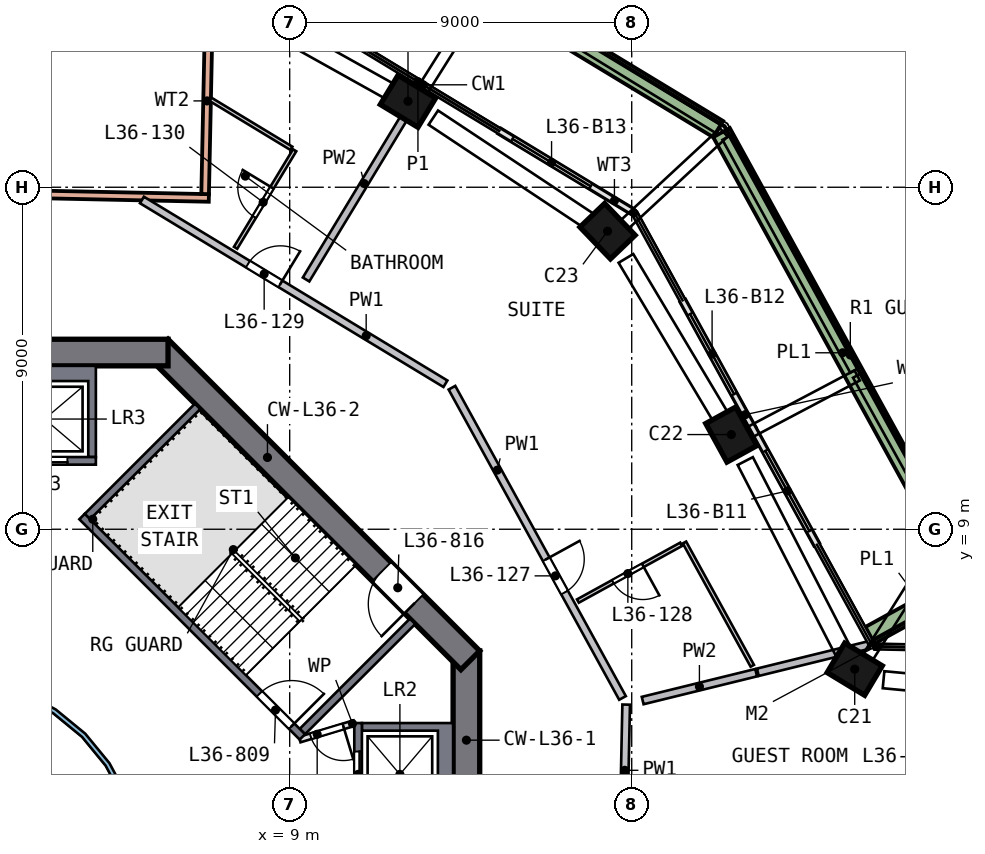
"""IFC4 building model, lengths in metres.
Left out: names, types, materials, properties, quantities, classifications, styles, units other than length and angle.
Written with IfcOpenShell. Run it as: python <this file> out.ifc"""

import sys

from ifc_helpers import new_model, si_unit, direction, frame, frame_2d, origin, origin_2d, place, context, subcontext, project, spatial, polyline, rectangle, outline, extrude, element, fill, save


model = new_model("IFC4")
c1 = context("Model", 3, precision=1e-05, world=origin(), true_north=direction((0.0, 1.0)))
c2 = subcontext(c1, "Body", "Model", "MODEL_VIEW")
j1 = project(units=[si_unit("LENGTHUNIT", "METRE"), si_unit("PLANEANGLEUNIT", "RADIAN")], contexts=[c1])
p1 = place(None, origin())
s1 = spatial("IfcSite", under=j1, at=p1, CompositionType="ELEMENT")
p2 = place(p1, origin())
s2 = spatial("IfcBuilding", under=s1, at=p2, CompositionType="ELEMENT")
p3 = place(p2, frame((0.0, 0.0, 150.5)))
s3 = spatial("IfcBuildingStorey", under=s2, at=p3, CompositionType="ELEMENT", Elevation=150.5)
p4 = place(p3, frame((23.899, 5.181, 0.0), z_axis=(-0.025617194, 0.113414997, 0.993217397), x_axis=(0.856238754, -0.510292454, 0.080354263)))
e1 = element("IfcColumn", 1, at=p4, inside=s3, PredefinedType="COLUMN", context=c2, shape_type="SweptSolid", body=[
    extrude(rectangle(XDim=1.15, YDim=0.9, at=origin_2d()), origin(), (0.0, 0.0, 1.0), 3.212),
])
p5 = place(p3, frame((20.688, 11.373, 0.0), z_axis=(-0.054908013, 0.098028295, 0.993667733), x_axis=(-0.478217839, 0.871024775, -0.112354524)))
e2 = element("IfcColumn", 2, at=p5, inside=s3, PredefinedType="COLUMN", context=c2, shape_type="SweptSolid", body=[
    extrude(rectangle(XDim=1.15, YDim=0.9, at=origin_2d()), origin(), (0.0, 0.0, 1.0), 3.21),
])
p6 = place(p3, frame((17.461, 16.745, 0.0), z_axis=(-0.080284249, 0.082336971, 0.993365523), x_axis=(0.687431138, -0.717087466, 0.114995638)))
e3 = element("IfcColumn", 3, at=p6, inside=s3, PredefinedType="COLUMN", context=c2, shape_type="SweptSolid", body=[
    extrude(rectangle(XDim=1.15, YDim=0.9, at=origin_2d()), origin(), (0.0, 0.0, 1.0), 3.211),
])
p7 = place(p3, frame((12.23, 20.194, 0.0), z_axis=(-0.096507973, 0.057418061, 0.993674684), x_axis=(-0.849621729, 0.515299129, -0.112293037)))
e4 = element("IfcColumn", 4, at=p7, inside=s3, PredefinedType="COLUMN", context=c2, shape_type="SweptSolid", body=[
    extrude(rectangle(XDim=1.15, YDim=0.9, at=origin_2d()), origin(), (0.0, 0.0, 1.0), 3.21),
])
p8 = place(p3, frame((13.65, -5.799, 0.0), z_axis=(0.0, 0.0, 1.0), x_axis=(0.0, 1.0, 0.0)))
e5 = element("IfcWall", 5, at=p8, inside=s3, PredefinedType="SHEAR", context=c2, shape_type="SweptSolid", body=[
    extrude(rectangle(XDim=11.598, YDim=0.7, at=frame_2d((5.799, 0.0))), origin(), (0.0, 0.0, 1.0), 3.5),
])
p9 = place(p8, frame((4.899, 0.0, 0.0)))
e6 = element("IfcOpeningElement", 6, at=p9, cuts=e5, PredefinedType="OPENING", context=c2, shape_type="SweptSolid", body=[
    extrude(rectangle(XDim=1.8, YDim=2.1, at=frame_2d((0.9, 1.05))), frame((0.0, 0.36, 0.0), z_axis=(0.0, -1.0, 0.0), x_axis=(1.0, 0.0, 0.0)), (0.0, 0.0, 1.0), 0.72),
])
p10 = place(p3, frame((13.752, 5.552, 0.0), z_axis=(0.0, 0.0, 1.0), x_axis=(-0.707106781, 0.707106781, 0.0)))
e7 = element("IfcWall", 7, at=p10, inside=s3, PredefinedType="SHEAR", context=c2, shape_type="SweptSolid", body=[
    extrude(rectangle(XDim=11.598, YDim=0.7, at=frame_2d((5.799, 0.0))), origin(), (0.0, 0.0, 1.0), 3.5),
])
p11 = place(p10, frame((2.099, 0.0, 0.0)))
e8 = element("IfcOpeningElement", 8, at=p11, cuts=e7, PredefinedType="OPENING", context=c2, shape_type="SweptSolid", body=[
    extrude(rectangle(XDim=1.2, YDim=2.1, at=frame_2d((0.6, 1.05))), frame((0.0, 0.36, 0.0), z_axis=(0.0, -1.0, 0.0), x_axis=(1.0, 0.0, 0.0)), (0.0, 0.0, 1.0), 0.72),
])
p12 = place(p3, frame((5.799, 13.65, 0.0), z_axis=(0.0, 0.0, 1.0), x_axis=(-1.0, 0.0, 0.0)))
e9 = element("IfcWall", 9, at=p12, inside=s3, PredefinedType="SHEAR", context=c2, shape_type="SweptSolid", body=[
    extrude(rectangle(XDim=11.598, YDim=0.7, at=frame_2d((5.799, 0.0))), origin(), (0.0, 0.0, 1.0), 3.5),
])
p13 = place(p12, frame((4.899, 0.0, 0.0)))
e10 = element("IfcOpeningElement", 10, at=p13, cuts=e9, PredefinedType="OPENING", context=c2, shape_type="SweptSolid", body=[
    extrude(rectangle(XDim=1.8, YDim=2.1, at=frame_2d((0.9, 1.05))), frame((0.0, 0.36, 0.0), z_axis=(0.0, -1.0, 0.0), x_axis=(1.0, 0.0, 0.0)), (0.0, 0.0, 1.0), 0.72),
])
p14 = place(p3, frame((22.866, 8.605, 0.0), z_axis=(0.0, 0.0, 1.0), x_axis=(-0.481802779, 0.876279683, 0.0)))
e11 = element("IfcWall", 11, at=p14, inside=s3, PredefinedType="SOLIDWALL", context=c2, shape_type="SweptSolid", body=[
    extrude(rectangle(XDim=3.475, YDim=0.15, at=frame_2d((1.738, 0.0))), origin(), (0.0, 0.0, 1.0), 2.475),
])
p15 = place(p14, frame((0.4, 0.0, 0.0)))
e12 = element("IfcOpeningElement", 12, at=p15, cuts=e11, PredefinedType="OPENING", context=c2, shape_type="SweptSolid", body=[
    extrude(rectangle(XDim=2.4, YDim=2.4, at=frame_2d((1.2, 1.2))), frame((0.0, 0.085, 0.0), z_axis=(0.0, -1.0, 0.0), x_axis=(1.0, 0.0, 0.0)), (0.0, 0.0, 1.0), 0.17),
])
p16 = place(p3, frame((21.192, 11.65, 0.0), z_axis=(0.0, 0.0, 1.0), x_axis=(-0.481730588, 0.876319371, 0.0)))
e13 = element("IfcWall", 13, at=p16, inside=s3, PredefinedType="SOLIDWALL", context=c2, shape_type="SweptSolid", body=[
    extrude(rectangle(XDim=3.835, YDim=0.15, at=frame_2d((1.918, 0.0))), origin(), (0.0, 0.0, 1.0), 2.475),
])
p17 = place(p16, frame((1.035, 0.0, 0.0)))
e14 = element("IfcOpeningElement", 14, at=p17, cuts=e13, PredefinedType="OPENING", context=c2, shape_type="SweptSolid", body=[
    extrude(rectangle(XDim=2.4, YDim=2.4, at=frame_2d((1.2, 1.2))), frame((0.0, 0.085, 0.0), z_axis=(0.0, -1.0, 0.0), x_axis=(1.0, 0.0, 0.0)), (0.0, 0.0, 1.0), 0.17),
])
p18 = place(p3, frame((18.002, 17.37, 0.0), z_axis=(0.0, 0.0, 1.0), x_axis=(-0.855372717, 0.518013045, 0.0)))
e15 = element("IfcWall", 15, at=p18, inside=s3, PredefinedType="SOLIDWALL", context=c2, shape_type="SweptSolid", body=[
    extrude(rectangle(XDim=4.068, YDim=0.15, at=frame_2d((2.034, 0.0))), origin(), (0.0, 0.0, 1.0), 2.475),
])
p19 = place(p18, frame((1.268, 0.0, 0.0)))
e16 = element("IfcOpeningElement", 16, at=p19, cuts=e15, PredefinedType="OPENING", context=c2, shape_type="SweptSolid", body=[
    extrude(rectangle(XDim=2.4, YDim=2.4, at=frame_2d((1.2, 1.2))), frame((0.0, 0.085, 0.0), z_axis=(0.0, -1.0, 0.0), x_axis=(1.0, 0.0, 0.0)), (0.0, 0.0, 1.0), 0.17),
])
p20 = place(p3, frame((24.27, 6.21, 0.0), z_axis=(0.0, 0.0, 1.0), x_axis=(0.876333505, 0.481704876, 0.0)))
e17 = element("IfcWall", 17, at=p20, inside=s3, PredefinedType="SOLIDWALL", context=c2, shape_type="SweptSolid", body=[
    extrude(rectangle(XDim=3.199, YDim=0.5, at=frame_2d((1.6, 0.0))), origin(), (0.0, 0.0, 1.0), 0.7),
])
p21 = place(p3, frame((26.733, 7.85, 0.0), z_axis=(0.0, 0.0, 1.0), x_axis=(-0.481759986, 0.87630321, 0.0)))
e18 = element("IfcWall", 18, at=p21, inside=s3, PredefinedType="SOLIDWALL", context=c2, shape_type="SweptSolid", body=[
    extrude(rectangle(XDim=13.224, YDim=0.5, at=frame_2d((6.612, 0.0))), origin(), (0.0, 0.0, 1.0), 0.7),
])
p22 = place(p3, frame((20.273, 19.531, 0.0), z_axis=(0.0, 0.0, 1.0), x_axis=(-0.855368156, 0.518020576, 0.0)))
e19 = element("IfcWall", 19, at=p22, inside=s3, PredefinedType="SOLIDWALL", context=c2, shape_type="SweptSolid", body=[
    extrude(rectangle(XDim=13.724, YDim=0.5, at=frame_2d((6.862, 0.0))), origin(), (0.0, 0.0, 1.0), 0.7),
])
p23 = place(p3, frame((-6.125, 17.99, 0.0), z_axis=(0.0, 0.0, 1.0), x_axis=(0.999780737, -0.020939881, 0.0)))
e20 = element("IfcWall", 20, at=p23, inside=s3, PredefinedType="SOLIDWALL", context=c2, shape_type="SweptSolid", body=[
    extrude(rectangle(XDim=13.0, YDim=0.2, at=frame_2d((6.5, 0.0))), origin(), (0.0, 0.0, 1.0), 3.19),
])
p24 = place(p23, frame((5.6, 0.0, 0.0)))
e21 = element("IfcOpeningElement", 21, at=p24, cuts=e20, PredefinedType="OPENING", context=c2, shape_type="SweptSolid", body=[
    extrude(rectangle(XDim=1.8, YDim=2.4, at=frame_2d((0.9, 1.2))), frame((0.0, 0.11, 0.0), z_axis=(0.0, -1.0, 0.0), x_axis=(1.0, 0.0, 0.0)), (0.0, 0.0, 1.0), 0.22),
])
p25 = place(p3, frame((6.877, 22.724, 0.0), z_axis=(0.0, 0.0, 1.0), x_axis=(-0.020957356, -0.99978037, 0.0)))
e22 = element("IfcWall", 22, at=p25, inside=s3, PredefinedType="SOLIDWALL", context=c2, shape_type="SweptSolid", body=[
    extrude(rectangle(XDim=4.904, YDim=0.2, at=frame_2d((2.452, 0.0))), origin(), (0.0, 0.0, 1.0), 3.19),
])
p26 = place(p3, origin())
e23 = element("IfcWall", 23, at=p26, inside=s3, PredefinedType="SOLIDWALL", context=c2, shape_type="SweptSolid", body=[
    extrude(outline(polyline([(13.3, 3.9), (13.3, 1.2), (10.9, 1.2), (10.9, 1.4), (12.9, 1.4), (12.9, 3.7), (10.9, 3.7), (10.9, 3.9), (13.3, 3.9)])), origin(), (0.0, 0.0, 1.0), 3.19),
])
p27 = place(p3, frame((10.8, 1.2, 0.0), z_axis=(0.0, 0.0, 1.0), x_axis=(0.0, 1.0, 0.0)))
e24 = element("IfcWall", 24, at=p27, inside=s3, PredefinedType="SOLIDWALL", context=c2, shape_type="SweptSolid", body=[
    extrude(rectangle(XDim=2.7, YDim=0.2, at=frame_2d((1.35, 0.0))), origin(), (0.0, 0.0, 1.0), 3.19),
])
p28 = place(p27, frame((0.75, 0.0, 0.0)))
e25 = element("IfcOpeningElement", 25, at=p28, cuts=e24, PredefinedType="OPENING", context=c2, shape_type="SweptSolid", body=[
    extrude(rectangle(XDim=1.2, YDim=2.1, at=frame_2d((0.6, 1.05))), frame((0.0, 0.11, 0.0), z_axis=(0.0, -1.0, 0.0), x_axis=(1.0, 0.0, 0.0)), (0.0, 0.0, 1.0), 0.22),
])
p29 = place(p3, origin())
e26 = element("IfcWall", 26, at=p29, inside=s3, PredefinedType="SOLIDWALL", context=c2, shape_type="SweptSolid", body=[
    extrude(outline(polyline([(3.9, 13.3), (3.9, 10.9), (3.7, 10.9), (3.7, 12.9), (1.4, 12.9), (1.4, 10.9), (1.2, 10.9), (1.2, 13.3), (3.9, 13.3)])), origin(), (0.0, 0.0, 1.0), 3.19),
])
p30 = place(p3, frame((1.2, 10.8, 0.0), z_axis=(0.0, 0.0, 1.0), x_axis=(1.0, 0.0, 0.0)))
e27 = element("IfcWall", 27, at=p30, inside=s3, PredefinedType="SOLIDWALL", context=c2, shape_type="SweptSolid", body=[
    extrude(rectangle(XDim=2.7, YDim=0.2, at=frame_2d((1.35, 0.0))), origin(), (0.0, 0.0, 1.0), 3.19),
])
p31 = place(p30, frame((0.75, 0.0, 0.0)))
e28 = element("IfcOpeningElement", 28, at=p31, cuts=e27, PredefinedType="OPENING", context=c2, shape_type="SweptSolid", body=[
    extrude(rectangle(XDim=1.2, YDim=2.1, at=frame_2d((0.6, 1.05))), frame((0.0, 0.11, 0.0), z_axis=(0.0, -1.0, 0.0), x_axis=(1.0, 0.0, 0.0)), (0.0, 0.0, 1.0), 0.22),
])
p32 = place(p3, frame((3.535, 9.334, 0.0), z_axis=(0.0, 0.0, 1.0), x_axis=(0.707106781, -0.707106781, 0.0)))
e29 = element("IfcWall", 29, at=p32, inside=s3, PredefinedType="SOLIDWALL", context=c2, shape_type="SweptSolid", body=[
    extrude(rectangle(XDim=8.2, YDim=0.2, at=frame_2d((4.1, 0.0))), origin(), (0.0, 0.0, 1.0), 3.19),
])
p33 = place(p32, frame((6.6, 0.0, 0.0)))
e30 = element("IfcOpeningElement", 30, at=p33, cuts=e29, PredefinedType="OPENING", context=c2, shape_type="SweptSolid", body=[
    extrude(rectangle(XDim=1.2, YDim=2.1, at=frame_2d((0.6, 1.05))), frame((0.0, 0.11, 0.0), z_axis=(0.0, -1.0, 0.0), x_axis=(1.0, 0.0, 0.0)), (0.0, 0.0, 1.0), 0.22),
])
for number, where, z_axis, x_axis in (
    (31, (9.334, 3.677, 0.0), (0.0, 0.0, 1.0), (0.707, 0.707, 0.0)),
    (32, (3.677, 9.334, 0.0), (0.0, 0.0, 1.0), (0.707, 0.707, 0.0)),
):
    element("IfcWall", number, at=place(p3, frame(where, z_axis=z_axis, x_axis=x_axis)), inside=s3, PredefinedType="SOLIDWALL", context=c2, shape_type="SweptSolid", body=[
        extrude(rectangle(XDim=4.1, YDim=0.2, at=frame_2d((2.05, 0.0))), origin(), (0.0, 0.0, 1.0), 3.19),
    ])
p34 = place(p3, frame((10.7, 3.9, 0.0), z_axis=(0.0, 0.0, 1.0), x_axis=(-0.957084567, -0.289808785, 0.0)))
e33 = element("IfcWall", 33, at=p34, inside=s3, PredefinedType="PARTITIONING", context=c2, shape_type="SweptSolid", body=[
    extrude(rectangle(XDim=1.501, YDim=0.15, at=frame_2d((0.75, 0.0))), origin(), (0.0, 0.0, 1.0), 3.19),
])
p35 = place(p34, frame((0.301, 0.0, 0.0)))
e34 = element("IfcOpeningElement", 34, at=p35, cuts=e33, PredefinedType="OPENING", context=c2, shape_type="SweptSolid", body=[
    extrude(rectangle(XDim=0.9, YDim=2.1, at=frame_2d((0.45, 1.05))), frame((0.0, 0.085, 0.0), z_axis=(0.0, -1.0, 0.0), x_axis=(1.0, 0.0, 0.0)), (0.0, 0.0, 1.0), 0.17),
])
p36 = place(p3, origin())
e35 = element("IfcWall", 35, at=p36, inside=s3, PredefinedType="SOLIDWALL", context=c2, shape_type="SweptSolid", body=[
    extrude(outline(polyline([(5.021, -0.999), (4.73, -1.959), (4.257, -2.844), (3.62, -3.62), (2.844, -4.257), (1.959, -4.73), (0.999, -5.021), (0.0, -5.12), (-0.999, -5.021), (-1.959, -4.73), (-2.844, -4.257), (-3.62, -3.62), (-4.257, -2.844), (-4.73, -1.959), (-5.021, -0.999), (-5.12, 0.0), (-5.021, 0.999), (-4.73, 1.959), (-4.257, 2.844), (-3.62, 3.62), (-2.844, 4.257), (-1.959, 4.73), (-0.999, 5.021), (0.0, 5.12), (0.999, 5.021), (1.959, 4.73), (2.844, 4.257), (3.62, 3.62), (4.257, 2.844), (4.73, 1.959), (5.021, 0.999), (5.12, 0.0), (5.021, -0.999)]), holes=[polyline([(4.904, 0.976), (4.619, 1.913), (4.157, 2.778), (3.535, 3.535), (2.778, 4.157), (1.913, 4.619), (0.976, 4.904), (0.0, 5.0), (-0.976, 4.904), (-1.913, 4.619), (-2.778, 4.157), (-3.535, 3.535), (-4.157, 2.778), (-4.619, 1.913), (-4.904, 0.976), (-5.0, 0.0), (-4.904, -0.976), (-4.619, -1.913), (-4.157, -2.778), (-3.535, -3.535), (-2.778, -4.157), (-1.913, -4.619), (-0.976, -4.904), (0.0, -5.0), (0.976, -4.904), (1.913, -4.619), (2.778, -4.157), (3.535, -3.535), (4.157, -2.778), (4.619, -1.913), (4.904, -0.976), (5.0, 0.0), (4.904, 0.976)])]), origin(), (0.0, 0.0, 1.0), 3.19),
])
p37 = place(p3, frame((5.112, 17.665, 0.0), z_axis=(0.0, 0.0, 1.0), x_axis=(0.855374458, -0.51801017, 0.0)))
e36 = element("IfcWall", 36, at=p37, inside=s3, PredefinedType="SOLIDWALL", context=c2, shape_type="SweptSolid", body=[
    extrude(rectangle(XDim=9.336, YDim=0.2, at=frame_2d((4.668, 0.0))), origin(), (0.0, 0.0, 1.0), 3.19),
])
p38 = place(p37, frame((3.26, 0.0, 0.0)))
e37 = element("IfcOpeningElement", 37, at=p38, cuts=e36, PredefinedType="OPENING", context=c2, shape_type="SweptSolid", body=[
    extrude(rectangle(XDim=1.0, YDim=2.1, at=frame_2d((0.5, 1.05))), frame((0.0, 0.11, 0.0), z_axis=(0.0, -1.0, 0.0), x_axis=(1.0, 0.0, 0.0)), (0.0, 0.0, 1.0), 0.22),
])
p39 = place(p3, frame((13.27, 12.724, 0.0), z_axis=(0.0, 0.0, 1.0), x_axis=(0.481759791, -0.876303317, 0.0)))
e38 = element("IfcWall", 38, at=p39, inside=s3, PredefinedType="SOLIDWALL", context=c2, shape_type="SweptSolid", body=[
    extrude(rectangle(XDim=9.316, YDim=0.2, at=frame_2d((4.658, 0.0))), origin(), (0.0, 0.0, 1.0), 3.19),
])
p40 = place(p39, frame((5.15, 0.0, 0.0)))
e39 = element("IfcOpeningElement", 39, at=p40, cuts=e38, PredefinedType="OPENING", context=c2, shape_type="SweptSolid", body=[
    extrude(rectangle(XDim=1.0, YDim=2.1, at=frame_2d((0.5, 1.05))), frame((0.0, 0.11, 0.0), z_axis=(0.0, -1.0, 0.0), x_axis=(1.0, 0.0, 0.0)), (0.0, 0.0, 1.0), 0.22),
])
p41 = place(p3, frame((17.782, 0.928, 0.0), z_axis=(0.0, 0.0, 1.0), x_axis=(0.020894964, 0.999781676, 0.0)))
e40 = element("IfcWall", 40, at=p41, inside=s3, PredefinedType="SOLIDWALL", context=c2, shape_type="SweptSolid", body=[
    extrude(rectangle(XDim=3.458, YDim=0.2, at=frame_2d((1.729, 0.0))), origin(), (0.0, 0.0, 1.0), 3.19),
])
p42 = place(p3, frame((9.431, 15.573, 0.0), z_axis=(0.0, 0.0, 1.0), x_axis=(0.518049609, 0.855350573, 0.0)))
e41 = element("IfcWall", 41, at=p42, inside=s3, PredefinedType="SOLIDWALL", context=c2, shape_type="SweptSolid", body=[
    extrude(rectangle(XDim=5.903, YDim=0.2, at=frame_2d((2.951, 0.0))), origin(), (0.0, 0.0, 1.0), 3.19),
])
p43 = place(p3, frame((18.288, 4.492, 0.0), z_axis=(0.0, 0.0, 1.0), x_axis=(0.971138358, 0.238516853, 0.0)))
e42 = element("IfcWall", 42, at=p43, inside=s3, PredefinedType="SOLIDWALL", context=c2, shape_type="SweptSolid", body=[
    extrude(rectangle(XDim=3.075, YDim=0.2, at=frame_2d((1.537, 0.0))), origin(), (0.0, 0.0, 1.0), 3.19),
])
p44 = place(p3, frame((21.319, 5.236, 0.0), z_axis=(0.0, 0.0, 1.0), x_axis=(0.97111698, 0.23860388, 0.0)))
e43 = element("IfcWall", 43, at=p44, inside=s3, PredefinedType="SOLIDWALL", context=c2, shape_type="SweptSolid", body=[
    extrude(rectangle(XDim=3.011, YDim=0.2, at=frame_2d((1.506, 0.0))), origin(), (0.0, 0.0, 1.0), 3.19),
])
p45 = place(p3, frame((6.91, 20.318, 0.0), z_axis=(0.0, 0.0, 1.0), x_axis=(0.855354114, -0.518043762, 0.0)))
e44 = element("IfcWall", 44, at=p45, inside=s3, PredefinedType="PARTITIONING", context=c2, shape_type="SweptSolid", body=[
    extrude(rectangle(XDim=2.496, YDim=0.1, at=frame_2d((1.248, 0.0))), origin(), (0.0, 0.0, 1.0), 3.19),
])
p46 = place(p3, frame((7.576, 16.406, 0.0), z_axis=(0.0, 0.0, 1.0), x_axis=(0.518045593, 0.855353005, 0.0)))
e45 = element("IfcWall", 45, at=p46, inside=s3, PredefinedType="PARTITIONING", context=c2, shape_type="SweptSolid", body=[
    extrude(rectangle(XDim=3.0, YDim=0.1, at=frame_2d((1.5, 0.0))), origin(), (0.0, 0.0, 1.0), 3.19),
])
p47 = place(p46, frame((0.95, 0.0, 0.0)))
e46 = element("IfcOpeningElement", 46, at=p47, cuts=e45, PredefinedType="OPENING", context=c2, shape_type="SweptSolid", body=[
    extrude(rectangle(XDim=0.9, YDim=2.1, at=frame_2d((0.45, 1.05))), frame((0.0, 0.06, 0.0), z_axis=(0.0, -1.0, 0.0), x_axis=(1.0, 0.0, 0.0)), (0.0, 0.0, 1.0), 0.12),
])
p48 = place(p3, frame((19.301, 8.604, 0.0), z_axis=(0.0, 0.0, 1.0), x_axis=(-0.87631067, -0.481746416, 0.0)))
e47 = element("IfcWall", 47, at=p48, inside=s3, PredefinedType="PARTITIONING", context=c2, shape_type="SweptSolid", body=[
    extrude(rectangle(XDim=3.1, YDim=0.1, at=frame_2d((1.55, 0.0))), origin(), (0.0, 0.0, 1.0), 3.19),
])
p49 = place(p48, frame((1.15, 0.0, 0.0)))
e48 = element("IfcOpeningElement", 48, at=p49, cuts=e47, PredefinedType="OPENING", context=c2, shape_type="SweptSolid", body=[
    extrude(rectangle(XDim=0.9, YDim=2.1, at=frame_2d((0.45, 1.05))), frame((0.0, 0.06, 0.0), z_axis=(0.0, -1.0, 0.0), x_axis=(1.0, 0.0, 0.0)), (0.0, 0.0, 1.0), 0.12),
])
p50 = place(p3, frame((19.388, 8.652, 0.0), z_axis=(0.0, 0.0, 1.0), x_axis=(0.481754276, -0.876306349, 0.0)))
e49 = element("IfcWall", 49, at=p50, inside=s3, PredefinedType="PARTITIONING", context=c2, shape_type="SweptSolid", body=[
    extrude(rectangle(XDim=3.704, YDim=0.1, at=frame_2d((1.852, 0.0))), origin(), (0.0, 0.0, 1.0), 3.19),
])
p51 = place(p15, origin())
e50 = element("IfcDoor", 50, at=p51, inside=s3, OperationType="SLIDING_TO_RIGHT", PredefinedType="DOOR", context=c2, shape_type="SweptSolid", body=[
    extrude(rectangle(XDim=2.4, YDim=2.4, at=frame_2d((1.2, 1.2))), frame((0.0, 0.025, 0.0), z_axis=(0.0, -1.0, 0.0), x_axis=(1.0, 0.0, 0.0)), (0.0, 0.0, 1.0), 0.05),
])
fill(e12, e50)
p52 = place(p17, origin())
e51 = element("IfcDoor", 51, at=p52, inside=s3, OperationType="SLIDING_TO_LEFT", PredefinedType="DOOR", context=c2, shape_type="SweptSolid", body=[
    extrude(rectangle(XDim=2.4, YDim=2.4, at=frame_2d((1.2, 1.2))), frame((0.0, 0.025, 0.0), z_axis=(0.0, -1.0, 0.0), x_axis=(1.0, 0.0, 0.0)), (0.0, 0.0, 1.0), 0.05),
])
fill(e14, e51)
p53 = place(p19, origin())
e52 = element("IfcDoor", 52, at=p53, inside=s3, OperationType="SLIDING_TO_LEFT", PredefinedType="DOOR", context=c2, shape_type="SweptSolid", body=[
    extrude(rectangle(XDim=2.4, YDim=2.4, at=frame_2d((1.2, 1.2))), frame((0.0, 0.025, 0.0), z_axis=(0.0, -1.0, 0.0), x_axis=(1.0, 0.0, 0.0)), (0.0, 0.0, 1.0), 0.05),
])
fill(e16, e52)
p54 = place(p28, origin())
e53 = element("IfcDoor", 53, at=p54, inside=s3, OperationType="DOUBLE_DOOR_SLIDING", PredefinedType="DOOR", context=c2, shape_type="SweptSolid", body=[
    extrude(rectangle(XDim=1.2, YDim=2.1, at=frame_2d((0.6, 1.05))), frame((0.0, 0.025, 0.0), z_axis=(0.0, -1.0, 0.0), x_axis=(1.0, 0.0, 0.0)), (0.0, 0.0, 1.0), 0.05),
])
fill(e25, e53)
p55 = place(p31, origin())
e54 = element("IfcDoor", 54, at=p55, inside=s3, OperationType="DOUBLE_DOOR_SLIDING", PredefinedType="DOOR", context=c2, shape_type="SweptSolid", body=[
    extrude(rectangle(XDim=1.2, YDim=2.1, at=frame_2d((0.6, 1.05))), frame((0.0, 0.025, 0.0), z_axis=(0.0, -1.0, 0.0), x_axis=(1.0, 0.0, 0.0)), (0.0, 0.0, 1.0), 0.05),
])
fill(e28, e54)
p56 = place(p33, origin())
e55 = element("IfcDoor", 55, at=p56, inside=s3, OperationType="SINGLE_SWING_RIGHT", PredefinedType="DOOR", context=c2, shape_type="SweptSolid", body=[
    extrude(rectangle(XDim=1.2, YDim=2.1, at=frame_2d((0.6, 1.05))), frame((0.0, 0.025, 0.0), z_axis=(0.0, -1.0, 0.0), x_axis=(1.0, 0.0, 0.0)), (0.0, 0.0, 1.0), 0.05),
])
fill(e30, e55)
p57 = place(p11, origin())
e56 = element("IfcDoor", 56, at=p57, inside=s3, OperationType="SINGLE_SWING_LEFT", PredefinedType="DOOR", context=c2, shape_type="SweptSolid", body=[
    extrude(rectangle(XDim=1.2, YDim=2.1, at=frame_2d((0.6, 1.05))), frame((0.0, 0.025, 0.0), z_axis=(0.0, -1.0, 0.0), x_axis=(1.0, 0.0, 0.0)), (0.0, 0.0, 1.0), 0.05),
])
fill(e8, e56)
p58 = place(p35, origin())
e57 = element("IfcDoor", 57, at=p58, inside=s3, OperationType="SINGLE_SWING_LEFT", PredefinedType="DOOR", context=c2, shape_type="SweptSolid", body=[
    extrude(rectangle(XDim=0.9, YDim=2.1, at=frame_2d((0.45, 1.05))), frame((0.0, 0.025, 0.0), z_axis=(0.0, -1.0, 0.0), x_axis=(1.0, 0.0, 0.0)), (0.0, 0.0, 1.0), 0.05),
])
fill(e34, e57)
p59 = place(p40, origin())
e58 = element("IfcDoor", 58, at=p59, inside=s3, OperationType="SINGLE_SWING_LEFT", PredefinedType="DOOR", context=c2, shape_type="SweptSolid", body=[
    extrude(rectangle(XDim=1.0, YDim=2.1, at=frame_2d((0.5, 1.05))), frame((0.0, 0.025, 0.0), z_axis=(0.0, -1.0, 0.0), x_axis=(1.0, 0.0, 0.0)), (0.0, 0.0, 1.0), 0.05),
])
fill(e39, e58)
p60 = place(p49, origin())
e59 = element("IfcDoor", 59, at=p60, inside=s3, OperationType="SINGLE_SWING_LEFT", PredefinedType="DOOR", context=c2, shape_type="SweptSolid", body=[
    extrude(rectangle(XDim=0.9, YDim=2.1, at=frame_2d((0.45, 1.05))), frame((0.0, 0.025, 0.0), z_axis=(0.0, -1.0, 0.0), x_axis=(1.0, 0.0, 0.0)), (0.0, 0.0, 1.0), 0.05),
])
fill(e48, e59)
p61 = place(p38, origin())
e60 = element("IfcDoor", 60, at=p61, inside=s3, OperationType="SINGLE_SWING_RIGHT", PredefinedType="DOOR", context=c2, shape_type="SweptSolid", body=[
    extrude(rectangle(XDim=1.0, YDim=2.1, at=frame_2d((0.5, 1.05))), frame((0.0, 0.025, 0.0), z_axis=(0.0, -1.0, 0.0), x_axis=(1.0, 0.0, 0.0)), (0.0, 0.0, 1.0), 0.05),
])
fill(e37, e60)
p62 = place(p47, origin())
e61 = element("IfcDoor", 61, at=p62, inside=s3, OperationType="SINGLE_SWING_RIGHT", PredefinedType="DOOR", context=c2, shape_type="SweptSolid", body=[
    extrude(rectangle(XDim=0.9, YDim=2.1, at=frame_2d((0.45, 1.05))), frame((0.0, 0.025, 0.0), z_axis=(0.0, -1.0, 0.0), x_axis=(1.0, 0.0, 0.0)), (0.0, 0.0, 1.0), 0.05),
])
fill(e46, e61)
save(model, sys.argv[1])
